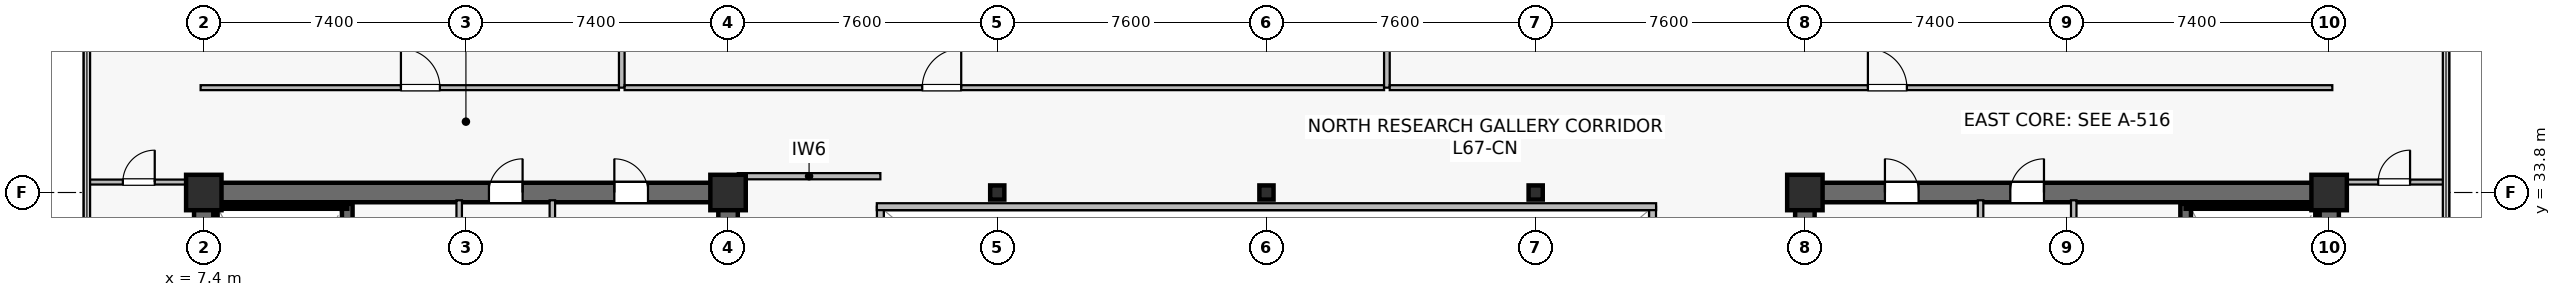
"""IFC4 building model, lengths in metres.
Left out: names, types, materials, properties, quantities, classifications, styles, units other than length and angle.
Written with IfcOpenShell. Run it as: python <this file> out.ifc"""

import sys

from ifc_helpers import new_model, si_unit, direction, frame, frame_2d, origin, origin_2d, place, context, subcontext, project, spatial, rectangle, hollow_rectangle, extrude, source, transform, mapped, element, fill, save


model = new_model("IFC4")
c1 = context("Model", 3, precision=1e-05, world=origin(), true_north=direction((0.0, 1.0)))
c2 = subcontext(c1, "Body", "Model", "MODEL_VIEW")
j1 = project(units=[si_unit("LENGTHUNIT", "METRE"), si_unit("PLANEANGLEUNIT", "RADIAN")], contexts=[c1])
p1 = place(None, origin())
s1 = spatial("IfcSite", under=j1, at=p1, CompositionType="ELEMENT")
p2 = place(p1, origin())
s2 = spatial("IfcBuilding", under=s1, at=p2, CompositionType="ELEMENT")
p3 = place(p2, frame((0.0, 0.0, 279.3)))
s3 = spatial("IfcBuildingStorey", under=s2, at=p3, CompositionType="ELEMENT", Elevation=279.3)
p4 = place(p3, frame((7.125, 33.8, 0.0), z_axis=(0.0, 0.0, 1.0), x_axis=(1.0, 0.0, 0.0)))
e1 = element("IfcWall", 1, at=p4, inside=s3, PredefinedType="SHEAR", context=c2, shape_type="SweptSolid", body=[
    extrude(rectangle(XDim=15.35, YDim=0.55, at=frame_2d((7.675, 0.0))), origin(), (0.0, 0.0, 1.0), 3.8),
])
p5 = place(p4, frame((8.325, 0.0, 0.0)))
e2 = element("IfcOpeningElement", 2, at=p5, cuts=e1, PredefinedType="OPENING", context=c2, shape_type="SweptSolid", body=[
    extrude(rectangle(XDim=0.95, YDim=2.15, at=frame_2d((0.475, 1.075))), frame((0.0, 0.285, 0.0), z_axis=(0.0, -1.0, 0.0), x_axis=(1.0, 0.0, 0.0)), (0.0, 0.0, 1.0), 0.57),
])
p6 = place(p4, frame((11.865, 0.0, 0.0)))
e3 = element("IfcOpeningElement", 3, at=p6, cuts=e1, PredefinedType="OPENING", context=c2, shape_type="SweptSolid", body=[
    extrude(rectangle(XDim=0.95, YDim=2.15, at=frame_2d((0.475, 1.075))), frame((0.0, 0.285, 0.0), z_axis=(0.0, -1.0, 0.0), x_axis=(1.0, 0.0, 0.0)), (0.0, 0.0, 1.0), 0.57),
])
p7 = place(p3, frame((7.4, 15.075, 0.0), z_axis=(0.0, 0.0, 1.0), x_axis=(0.0, 1.0, 0.0)))
e4 = element("IfcWall", 4, at=p7, inside=s3, PredefinedType="SHEAR", context=c2, shape_type="SweptSolid", body=[
    extrude(rectangle(XDim=18.45, YDim=0.55, at=frame_2d((9.225, 0.0))), origin(), (0.0, 0.0, 1.0), 3.8),
])
p8 = place(p3, frame((22.2, 15.075, 0.0), z_axis=(0.0, 0.0, 1.0), x_axis=(0.0, 1.0, 0.0)))
e5 = element("IfcWall", 5, at=p8, inside=s3, PredefinedType="SHEAR", context=c2, shape_type="SweptSolid", body=[
    extrude(rectangle(XDim=18.45, YDim=0.55, at=frame_2d((9.225, 0.0))), origin(), (0.0, 0.0, 1.0), 3.8),
])
p9 = place(p8, frame((3.475, 0.0, 0.0)))
e6 = element("IfcOpeningElement", 6, at=p9, cuts=e5, PredefinedType="OPENING", context=c2, shape_type="SweptSolid", body=[
    extrude(rectangle(XDim=1.42, YDim=2.2, at=frame_2d((0.71, 1.1))), frame((0.0, 0.285, 0.0), z_axis=(0.0, -1.0, 0.0), x_axis=(1.0, 0.0, 0.0)), (0.0, 0.0, 1.0), 0.57),
])
p10 = place(p3, frame((11.45, 24.85, 0.0), z_axis=(0.0, 0.0, 1.0), x_axis=(0.0, 1.0, 0.0)))
e7 = element("IfcWall", 7, at=p10, inside=s3, PredefinedType="SHEAR", context=c2, shape_type="SweptSolid", body=[
    extrude(rectangle(XDim=8.63, YDim=0.3, at=frame_2d((4.315, 0.0))), origin(), (0.0, 0.0, 1.0), 3.8),
])
p11 = place(p10, frame((0.42, 0.0, 0.0)))
e8 = element("IfcOpeningElement", 8, at=p11, cuts=e7, PredefinedType="OPENING", context=c2, shape_type="SweptSolid", body=[
    extrude(rectangle(XDim=1.1, YDim=2.15, at=frame_2d((0.55, 1.075))), frame((0.0, 0.16, 0.0), z_axis=(0.0, -1.0, 0.0), x_axis=(1.0, 0.0, 0.0)), (0.0, 0.0, 1.0), 0.32),
])
p12 = place(p3, frame((7.73, 33.4, 0.0), z_axis=(0.0, 0.0, 1.0), x_axis=(1.0, 0.0, 0.0)))
e9 = element("IfcWall", 9, at=p12, inside=s3, PredefinedType="SOLIDWALL", context=c2, shape_type="SweptSolid", body=[
    extrude(rectangle(XDim=3.72, YDim=0.12, at=frame_2d((1.86, 0.0))), origin(), (0.0, 0.0, 1.0), 3.8),
])
p13 = place(p3, frame((7.73, 25.0, 0.0), z_axis=(0.0, 0.0, 1.0), x_axis=(0.0, 1.0, 0.0)))
e10 = element("IfcWall", 10, at=p13, inside=s3, PredefinedType="SOLIDWALL", context=c2, shape_type="SweptSolid", body=[
    extrude(rectangle(XDim=8.32, YDim=0.12, at=frame_2d((4.16, 0.0))), origin(), (0.0, 0.0, 1.0), 3.8),
])
p14 = place(p3, frame((52.325, 33.8, 0.0), z_axis=(0.0, 0.0, 1.0), x_axis=(1.0, 0.0, 0.0)))
e11 = element("IfcWall", 11, at=p14, inside=s3, PredefinedType="SHEAR", context=c2, shape_type="SweptSolid", body=[
    extrude(rectangle(XDim=15.35, YDim=0.55, at=frame_2d((7.675, 0.0))), origin(), (0.0, 0.0, 1.0), 3.8),
])
p15 = place(p14, frame((6.075, 0.0, 0.0)))
e12 = element("IfcOpeningElement", 12, at=p15, cuts=e11, PredefinedType="OPENING", context=c2, shape_type="SweptSolid", body=[
    extrude(rectangle(XDim=0.95, YDim=2.15, at=frame_2d((0.475, 1.075))), frame((0.0, 0.285, 0.0), z_axis=(0.0, -1.0, 0.0), x_axis=(1.0, 0.0, 0.0)), (0.0, 0.0, 1.0), 0.57),
])
p16 = place(p14, frame((2.535, 0.0, 0.0)))
e13 = element("IfcOpeningElement", 13, at=p16, cuts=e11, PredefinedType="OPENING", context=c2, shape_type="SweptSolid", body=[
    extrude(rectangle(XDim=0.95, YDim=2.15, at=frame_2d((0.475, 1.075))), frame((0.0, 0.285, 0.0), z_axis=(0.0, -1.0, 0.0), x_axis=(1.0, 0.0, 0.0)), (0.0, 0.0, 1.0), 0.57),
])
p17 = place(p3, frame((52.6, 15.075, 0.0), z_axis=(0.0, 0.0, 1.0), x_axis=(0.0, 1.0, 0.0)))
e14 = element("IfcWall", 14, at=p17, inside=s3, PredefinedType="SHEAR", context=c2, shape_type="SweptSolid", body=[
    extrude(rectangle(XDim=18.45, YDim=0.55, at=frame_2d((9.225, 0.0))), origin(), (0.0, 0.0, 1.0), 3.8),
])
p18 = place(p17, frame((3.475, 0.0, 0.0)))
e15 = element("IfcOpeningElement", 15, at=p18, cuts=e14, PredefinedType="OPENING", context=c2, shape_type="SweptSolid", body=[
    extrude(rectangle(XDim=1.42, YDim=2.2, at=frame_2d((0.71, 1.1))), frame((0.0, 0.285, 0.0), z_axis=(0.0, -1.0, 0.0), x_axis=(1.0, 0.0, 0.0)), (0.0, 0.0, 1.0), 0.57),
])
p19 = place(p3, frame((67.4, 15.075, 0.0), z_axis=(0.0, 0.0, 1.0), x_axis=(0.0, 1.0, 0.0)))
e16 = element("IfcWall", 16, at=p19, inside=s3, PredefinedType="SHEAR", context=c2, shape_type="SweptSolid", body=[
    extrude(rectangle(XDim=18.45, YDim=0.55, at=frame_2d((9.225, 0.0))), origin(), (0.0, 0.0, 1.0), 3.8),
])
p20 = place(p3, frame((63.35, 24.85, 0.0), z_axis=(0.0, 0.0, 1.0), x_axis=(0.0, 1.0, 0.0)))
e17 = element("IfcWall", 17, at=p20, inside=s3, PredefinedType="SHEAR", context=c2, shape_type="SweptSolid", body=[
    extrude(rectangle(XDim=8.63, YDim=0.3, at=frame_2d((4.315, 0.0))), origin(), (0.0, 0.0, 1.0), 3.8),
])
p21 = place(p20, frame((0.42, 0.0, 0.0)))
e18 = element("IfcOpeningElement", 18, at=p21, cuts=e17, PredefinedType="OPENING", context=c2, shape_type="SweptSolid", body=[
    extrude(rectangle(XDim=1.1, YDim=2.15, at=frame_2d((0.55, 1.075))), frame((0.0, 0.16, 0.0), z_axis=(0.0, -1.0, 0.0), x_axis=(1.0, 0.0, 0.0)), (0.0, 0.0, 1.0), 0.32),
])
p22 = place(p3, frame((63.35, 33.4, 0.0), z_axis=(0.0, 0.0, 1.0), x_axis=(1.0, 0.0, 0.0)))
e19 = element("IfcWall", 19, at=p22, inside=s3, PredefinedType="SOLIDWALL", context=c2, shape_type="SweptSolid", body=[
    extrude(rectangle(XDim=3.72, YDim=0.12, at=frame_2d((1.86, 0.0))), origin(), (0.0, 0.0, 1.0), 3.8),
])
p23 = place(p3, frame((67.07, 25.0, 0.0), z_axis=(0.0, 0.0, 1.0), x_axis=(0.0, 1.0, 0.0)))
e20 = element("IfcWall", 20, at=p23, inside=s3, PredefinedType="SOLIDWALL", context=c2, shape_type="SweptSolid", body=[
    extrude(rectangle(XDim=8.32, YDim=0.12, at=frame_2d((4.16, 0.0))), origin(), (0.0, 0.0, 1.0), 3.8),
])
m1 = source(origin(), c2, "Body", "SweptSolid", [
    extrude(rectangle(XDim=1.0, YDim=1.0, at=origin_2d()), origin(), (0.0, 0.0, 1.0), 4.1),
])
for number, where, z_axis, x_axis in (
    (21, (7.4, 33.8, 0.0), (0.0, 0.0, 1.0), (1.0, 0.0, 0.0)),
    (22, (22.2, 33.8, 0.0), (0.0, 0.0, 1.0), (1.0, 0.0, 0.0)),
    (23, (52.6, 33.8, 0.0), (0.0, 0.0, 1.0), (1.0, 0.0, 0.0)),
    (24, (67.4, 33.8, 0.0), (0.0, 0.0, 1.0), (1.0, 0.0, 0.0)),
):
    element("IfcColumn", number, at=place(p3, frame(where, z_axis=z_axis, x_axis=x_axis)), inside=s3, PredefinedType="COLUMN", context=c2, shape_type="MappedRepresentation", body=[
        mapped(m1, transform((0.0, 0.0, 0.0), scale=1.0)),
    ])
m2 = source(origin(), c2, "Body", "SweptSolid", [
    extrude(hollow_rectangle(XDim=0.4, YDim=0.4, WallThickness=0.019, at=origin_2d()), origin(), (0.0, 0.0, 1.0), 4.1),
])
for number, where, z_axis, x_axis in (
    (25, (29.8, 33.8, 0.0), (0.0, 0.0, 1.0), (1.0, 0.0, 0.0)),
    (26, (37.4, 33.8, 0.0), (0.0, 0.0, 1.0), (1.0, 0.0, 0.0)),
    (27, (45.0, 33.8, 0.0), (0.0, 0.0, 1.0), (1.0, 0.0, 0.0)),
):
    element("IfcColumn", number, at=place(p3, frame(where, z_axis=z_axis, x_axis=x_axis)), inside=s3, PredefinedType="COLUMN", context=c2, shape_type="MappedRepresentation", body=[
        mapped(m2, transform((0.0, 0.0, 0.0), scale=1.0)),
    ])
p24 = place(p3, frame((14.61, 29.65, 0.0), z_axis=(0.0, 0.0, 1.0), x_axis=(0.0, 1.0, 0.0)))
e28 = element("IfcWall", 28, at=p24, inside=s3, PredefinedType="PLUMBINGWALL", context=c2, shape_type="SweptSolid", body=[
    extrude(rectangle(XDim=3.93, YDim=0.155, at=frame_2d((1.965, 0.0))), origin(), (0.0, 0.0, 1.0), 3.197),
])
p25 = place(p3, frame((17.24, 29.65, 0.0), z_axis=(0.0, 0.0, 1.0), x_axis=(0.0, 1.0, 0.0)))
e29 = element("IfcWall", 29, at=p25, inside=s3, PredefinedType="PLUMBINGWALL", context=c2, shape_type="SweptSolid", body=[
    extrude(rectangle(XDim=3.93, YDim=0.155, at=frame_2d((1.965, 0.0))), origin(), (0.0, 0.0, 1.0), 3.8),
])
p26 = place(p3, frame((60.19, 29.65, 0.0), z_axis=(0.0, 0.0, 1.0), x_axis=(0.0, 1.0, 0.0)))
e30 = element("IfcWall", 30, at=p26, inside=s3, PredefinedType="PLUMBINGWALL", context=c2, shape_type="SweptSolid", body=[
    extrude(rectangle(XDim=3.93, YDim=0.155, at=frame_2d((1.965, 0.0))), origin(), (0.0, 0.0, 1.0), 3.197),
])
p27 = place(p3, frame((57.56, 29.65, 0.0), z_axis=(0.0, 0.0, 1.0), x_axis=(0.0, 1.0, 0.0)))
e31 = element("IfcWall", 31, at=p27, inside=s3, PredefinedType="PLUMBINGWALL", context=c2, shape_type="SweptSolid", body=[
    extrude(rectangle(XDim=3.93, YDim=0.155, at=frame_2d((1.965, 0.0))), origin(), (0.0, 0.0, 1.0), 3.8),
])
p28 = place(p3, frame((22.475, 34.26, 0.0), z_axis=(0.0, 0.0, 1.0), x_axis=(1.0, 0.0, 0.0)))
e32 = element("IfcWall", 32, at=p28, inside=s3, PredefinedType="PARTITIONING", context=c2, shape_type="SweptSolid", body=[
    extrude(rectangle(XDim=4.025, YDim=0.175, at=frame_2d((2.012, 0.0))), origin(), (0.0, 0.0, 1.0), 3.535),
])
p29 = place(p3, frame((26.5, 15.2, 0.0), z_axis=(0.0, 0.0, 1.0), x_axis=(0.0, 1.0, 0.0)))
e33 = element("IfcWall", 33, at=p29, inside=s3, PredefinedType="SOLIDWALL", context=c2, shape_type="SweptSolid", body=[
    extrude(rectangle(XDim=18.2, YDim=0.195, at=frame_2d((9.1, 0.0))), origin(), (0.0, 0.0, 1.0), 3.8),
])
p30 = place(p29, frame((1.8, 0.0, 0.9)))
e34 = element("IfcOpeningElement", 34, at=p30, cuts=e33, PredefinedType="OPENING", context=c2, shape_type="SweptSolid", body=[
    extrude(rectangle(XDim=1.2, YDim=1.35, at=frame_2d((0.6, 0.675))), frame((0.0, 0.107, 0.0), z_axis=(0.0, -1.0, 0.0), x_axis=(1.0, 0.0, 0.0)), (0.0, 0.0, 1.0), 0.215),
])
p31 = place(p29, frame((13.2, 0.0, 0.9)))
e35 = element("IfcOpeningElement", 35, at=p31, cuts=e33, PredefinedType="OPENING", context=c2, shape_type="SweptSolid", body=[
    extrude(rectangle(XDim=1.2, YDim=1.35, at=frame_2d((0.6, 0.675))), frame((0.0, 0.107, 0.0), z_axis=(0.0, -1.0, 0.0), x_axis=(1.0, 0.0, 0.0)), (0.0, 0.0, 1.0), 0.215),
])
p32 = place(p3, frame((48.3, 15.2, 0.0), z_axis=(0.0, 0.0, 1.0), x_axis=(0.0, 1.0, 0.0)))
e36 = element("IfcWall", 36, at=p32, inside=s3, PredefinedType="SOLIDWALL", context=c2, shape_type="SweptSolid", body=[
    extrude(rectangle(XDim=18.2, YDim=0.195, at=frame_2d((9.1, 0.0))), origin(), (0.0, 0.0, 1.0), 3.8),
])
p33 = place(p32, frame((1.8, 0.0, 0.9)))
e37 = element("IfcOpeningElement", 37, at=p33, cuts=e36, PredefinedType="OPENING", context=c2, shape_type="SweptSolid", body=[
    extrude(rectangle(XDim=1.2, YDim=1.35, at=frame_2d((0.6, 0.675))), frame((0.0, 0.107, 0.0), z_axis=(0.0, -1.0, 0.0), x_axis=(1.0, 0.0, 0.0)), (0.0, 0.0, 1.0), 0.215),
])
p34 = place(p32, frame((13.2, 0.0, 0.9)))
e38 = element("IfcOpeningElement", 38, at=p34, cuts=e36, PredefinedType="OPENING", context=c2, shape_type="SweptSolid", body=[
    extrude(rectangle(XDim=1.2, YDim=1.35, at=frame_2d((0.6, 0.675))), frame((0.0, 0.107, 0.0), z_axis=(0.0, -1.0, 0.0), x_axis=(1.0, 0.0, 0.0)), (0.0, 0.0, 1.0), 0.215),
])
p35 = place(p3, frame((26.4, 33.4, 0.0), z_axis=(0.0, 0.0, 1.0), x_axis=(1.0, 0.0, 0.0)))
e39 = element("IfcWall", 39, at=p35, inside=s3, PredefinedType="SOLIDWALL", context=c2, shape_type="SweptSolid", body=[
    extrude(rectangle(XDim=22.0, YDim=0.195, at=frame_2d((11.0, 0.0))), origin(), (0.0, 0.0, 1.0), 3.8),
])
p36 = place(p3, frame((7.31, 36.76, 0.0), z_axis=(0.0, 0.0, 1.0), x_axis=(1.0, 0.0, 0.0)))
e40 = element("IfcWall", 40, at=p36, inside=s3, PredefinedType="PARTITIONING", context=c2, shape_type="SweptSolid", body=[
    extrude(rectangle(XDim=11.81, YDim=0.14, at=frame_2d((5.905, 0.0))), origin(), (0.0, 0.0, 1.0), 3.197),
])
p37 = place(p36, frame((5.655, 0.0, 0.0)))
e41 = element("IfcOpeningElement", 41, at=p37, cuts=e40, PredefinedType="OPENING", context=c2, shape_type="SweptSolid", body=[
    extrude(rectangle(XDim=1.1, YDim=2.18, at=frame_2d((0.55, 1.09))), frame((0.0, 0.08, 0.0), z_axis=(0.0, -1.0, 0.0), x_axis=(1.0, 0.0, 0.0)), (0.0, 0.0, 1.0), 0.16),
])
p38 = place(p3, frame((19.2, 36.76, 0.0), z_axis=(0.0, 0.0, 1.0), x_axis=(0.0, 1.0, 0.0)))
e42 = element("IfcWall", 42, at=p38, inside=s3, PredefinedType="PARTITIONING", context=c2, shape_type="SweptSolid", body=[
    extrude(rectangle(XDim=9.13, YDim=0.16, at=frame_2d((4.565, 0.0))), origin(), (0.0, 0.0, 1.0), 3.135),
])
p39 = place(p3, frame((19.28, 36.76, 0.0), z_axis=(0.0, 0.0, 1.0), x_axis=(1.0, 0.0, 0.0)))
e43 = element("IfcWall", 43, at=p39, inside=s3, PredefinedType="PARTITIONING", context=c2, shape_type="SweptSolid", body=[
    extrude(rectangle(XDim=21.44, YDim=0.14, at=frame_2d((10.72, 0.0))), origin(), (0.0, 0.0, 1.0), 3.197),
])
p40 = place(p39, frame((8.402, 0.0, 0.0)))
e44 = element("IfcOpeningElement", 44, at=p40, cuts=e43, PredefinedType="OPENING", context=c2, shape_type="SweptSolid", body=[
    extrude(rectangle(XDim=1.1, YDim=2.18, at=frame_2d((0.55, 1.09))), frame((0.0, 0.08, 0.0), z_axis=(0.0, -1.0, 0.0), x_axis=(1.0, 0.0, 0.0)), (0.0, 0.0, 1.0), 0.16),
])
p41 = place(p3, frame((40.8, 36.76, 0.0), z_axis=(0.0, 0.0, 1.0), x_axis=(0.0, 1.0, 0.0)))
e45 = element("IfcWall", 45, at=p41, inside=s3, PredefinedType="PARTITIONING", context=c2, shape_type="SweptSolid", body=[
    extrude(rectangle(XDim=7.93, YDim=0.16, at=frame_2d((3.965, 0.0))), origin(), (0.0, 0.0, 1.0), 3.135),
])
p42 = place(p3, frame((40.88, 36.76, 0.0), z_axis=(0.0, 0.0, 1.0), x_axis=(1.0, 0.0, 0.0)))
e46 = element("IfcWall", 46, at=p42, inside=s3, PredefinedType="PARTITIONING", context=c2, shape_type="SweptSolid", body=[
    extrude(rectangle(XDim=26.61, YDim=0.14, at=frame_2d((13.305, 0.0))), origin(), (0.0, 0.0, 1.0), 3.197),
])
p43 = place(p42, frame((13.499, 0.0, 0.0)))
e47 = element("IfcOpeningElement", 47, at=p43, cuts=e46, PredefinedType="OPENING", context=c2, shape_type="SweptSolid", body=[
    extrude(rectangle(XDim=1.1, YDim=2.18, at=frame_2d((0.55, 1.09))), frame((0.0, 0.08, 0.0), z_axis=(0.0, -1.0, 0.0), x_axis=(1.0, 0.0, 0.0)), (0.0, 0.0, 1.0), 0.16),
])
p44 = place(p3, frame((4.11, 34.095, 0.0), z_axis=(0.0, 0.0, 1.0), x_axis=(1.0, 0.0, 0.0)))
e48 = element("IfcWall", 48, at=p44, inside=s3, PredefinedType="PARTITIONING", context=c2, shape_type="SweptSolid", body=[
    extrude(rectangle(XDim=2.91, YDim=0.14, at=frame_2d((1.455, 0.0))), origin(), (0.0, 0.0, 1.0), 3.8),
])
p45 = place(p44, frame((1.005, 0.0, 0.0)))
e49 = element("IfcOpeningElement", 49, at=p45, cuts=e48, PredefinedType="OPENING", context=c2, shape_type="SweptSolid", body=[
    extrude(rectangle(XDim=0.9, YDim=2.1, at=frame_2d((0.45, 1.05))), frame((0.0, 0.08, 0.0), z_axis=(0.0, -1.0, 0.0), x_axis=(1.0, 0.0, 0.0)), (0.0, 0.0, 1.0), 0.16),
])
p46 = place(p3, frame((67.78, 34.095, 0.0), z_axis=(0.0, 0.0, 1.0), x_axis=(1.0, 0.0, 0.0)))
e50 = element("IfcWall", 50, at=p46, inside=s3, PredefinedType="PARTITIONING", context=c2, shape_type="SweptSolid", body=[
    extrude(rectangle(XDim=2.91, YDim=0.14, at=frame_2d((1.455, 0.0))), origin(), (0.0, 0.0, 1.0), 3.8),
])
p47 = place(p46, frame((1.005, 0.0, 0.0)))
e51 = element("IfcOpeningElement", 51, at=p47, cuts=e50, PredefinedType="OPENING", context=c2, shape_type="SweptSolid", body=[
    extrude(rectangle(XDim=0.9, YDim=2.1, at=frame_2d((0.45, 1.05))), frame((0.0, 0.08, 0.0), z_axis=(0.0, -1.0, 0.0), x_axis=(1.0, 0.0, 0.0)), (0.0, 0.0, 1.0), 0.16),
])
m3 = source(origin(), c2, "Body", "SweptSolid", [
    extrude(rectangle(XDim=0.95, YDim=2.15, at=frame_2d((0.475, 1.075))), frame((0.0, 0.025, 0.0), z_axis=(0.0, -1.0, 0.0), x_axis=(1.0, 0.0, 0.0)), (0.0, 0.0, 1.0), 0.05),
])
p48 = place(p5, origin())
e52 = element("IfcDoor", 52, at=p48, inside=s3, OperationType="SINGLE_SWING_RIGHT", PredefinedType="DOOR", context=c2, shape_type="MappedRepresentation", body=[
    mapped(m3, transform((0.0, 0.0, 0.0), scale=1.0)),
])
fill(e2, e52)
p49 = place(p6, origin())
e53 = element("IfcDoor", 53, at=p49, inside=s3, OperationType="SINGLE_SWING_LEFT", PredefinedType="DOOR", context=c2, shape_type="MappedRepresentation", body=[
    mapped(m3, transform((0.0, 0.0, 0.0), scale=1.0)),
])
fill(e3, e53)
p50 = place(p15, origin())
e54 = element("IfcDoor", 54, at=p50, inside=s3, OperationType="SINGLE_SWING_RIGHT", PredefinedType="DOOR", context=c2, shape_type="MappedRepresentation", body=[
    mapped(m3, transform((0.0, 0.0, 0.0), scale=1.0)),
])
fill(e12, e54)
p51 = place(p16, origin())
e55 = element("IfcDoor", 55, at=p51, inside=s3, OperationType="SINGLE_SWING_LEFT", PredefinedType="DOOR", context=c2, shape_type="MappedRepresentation", body=[
    mapped(m3, transform((0.0, 0.0, 0.0), scale=1.0)),
])
fill(e13, e55)
m4 = source(origin(), c2, "Body", "SweptSolid", [
    extrude(rectangle(XDim=1.1, YDim=2.18, at=frame_2d((0.55, 1.09))), frame((0.0, 0.025, 0.0), z_axis=(0.0, -1.0, 0.0), x_axis=(1.0, 0.0, 0.0)), (0.0, 0.0, 1.0), 0.05),
])
p52 = place(p37, origin())
e56 = element("IfcDoor", 56, at=p52, inside=s3, OperationType="SINGLE_SWING_LEFT", PredefinedType="DOOR", context=c2, shape_type="MappedRepresentation", body=[
    mapped(m4, transform((0.0, 0.0, 0.0), scale=1.0)),
])
fill(e41, e56)
p53 = place(p40, origin())
e57 = element("IfcDoor", 57, at=p53, inside=s3, OperationType="SINGLE_SWING_RIGHT", PredefinedType="DOOR", context=c2, shape_type="MappedRepresentation", body=[
    mapped(m4, transform((0.0, 0.0, 0.0), scale=1.0)),
])
fill(e44, e57)
p54 = place(p43, origin())
e58 = element("IfcDoor", 58, at=p54, inside=s3, OperationType="SINGLE_SWING_LEFT", PredefinedType="DOOR", context=c2, shape_type="MappedRepresentation", body=[
    mapped(m4, transform((0.0, 0.0, 0.0), scale=1.0)),
])
fill(e47, e58)
m5 = source(origin(), c2, "Body", "SweptSolid", [
    extrude(rectangle(XDim=0.9, YDim=2.1, at=frame_2d((0.45, 1.05))), frame((0.0, 0.025, 0.0), z_axis=(0.0, -1.0, 0.0), x_axis=(1.0, 0.0, 0.0)), (0.0, 0.0, 1.0), 0.05),
])
p55 = place(p45, origin())
e59 = element("IfcDoor", 59, at=p55, inside=s3, OperationType="SINGLE_SWING_RIGHT", PredefinedType="DOOR", context=c2, shape_type="MappedRepresentation", body=[
    mapped(m5, transform((0.0, 0.0, 0.0), scale=1.0)),
])
fill(e49, e59)
p56 = place(p47, origin())
e60 = element("IfcDoor", 60, at=p56, inside=s3, OperationType="SINGLE_SWING_RIGHT", PredefinedType="DOOR", context=c2, shape_type="MappedRepresentation", body=[
    mapped(m5, transform((0.0, 0.0, 0.0), scale=1.0)),
])
fill(e51, e60)
save(model, sys.argv[1])
